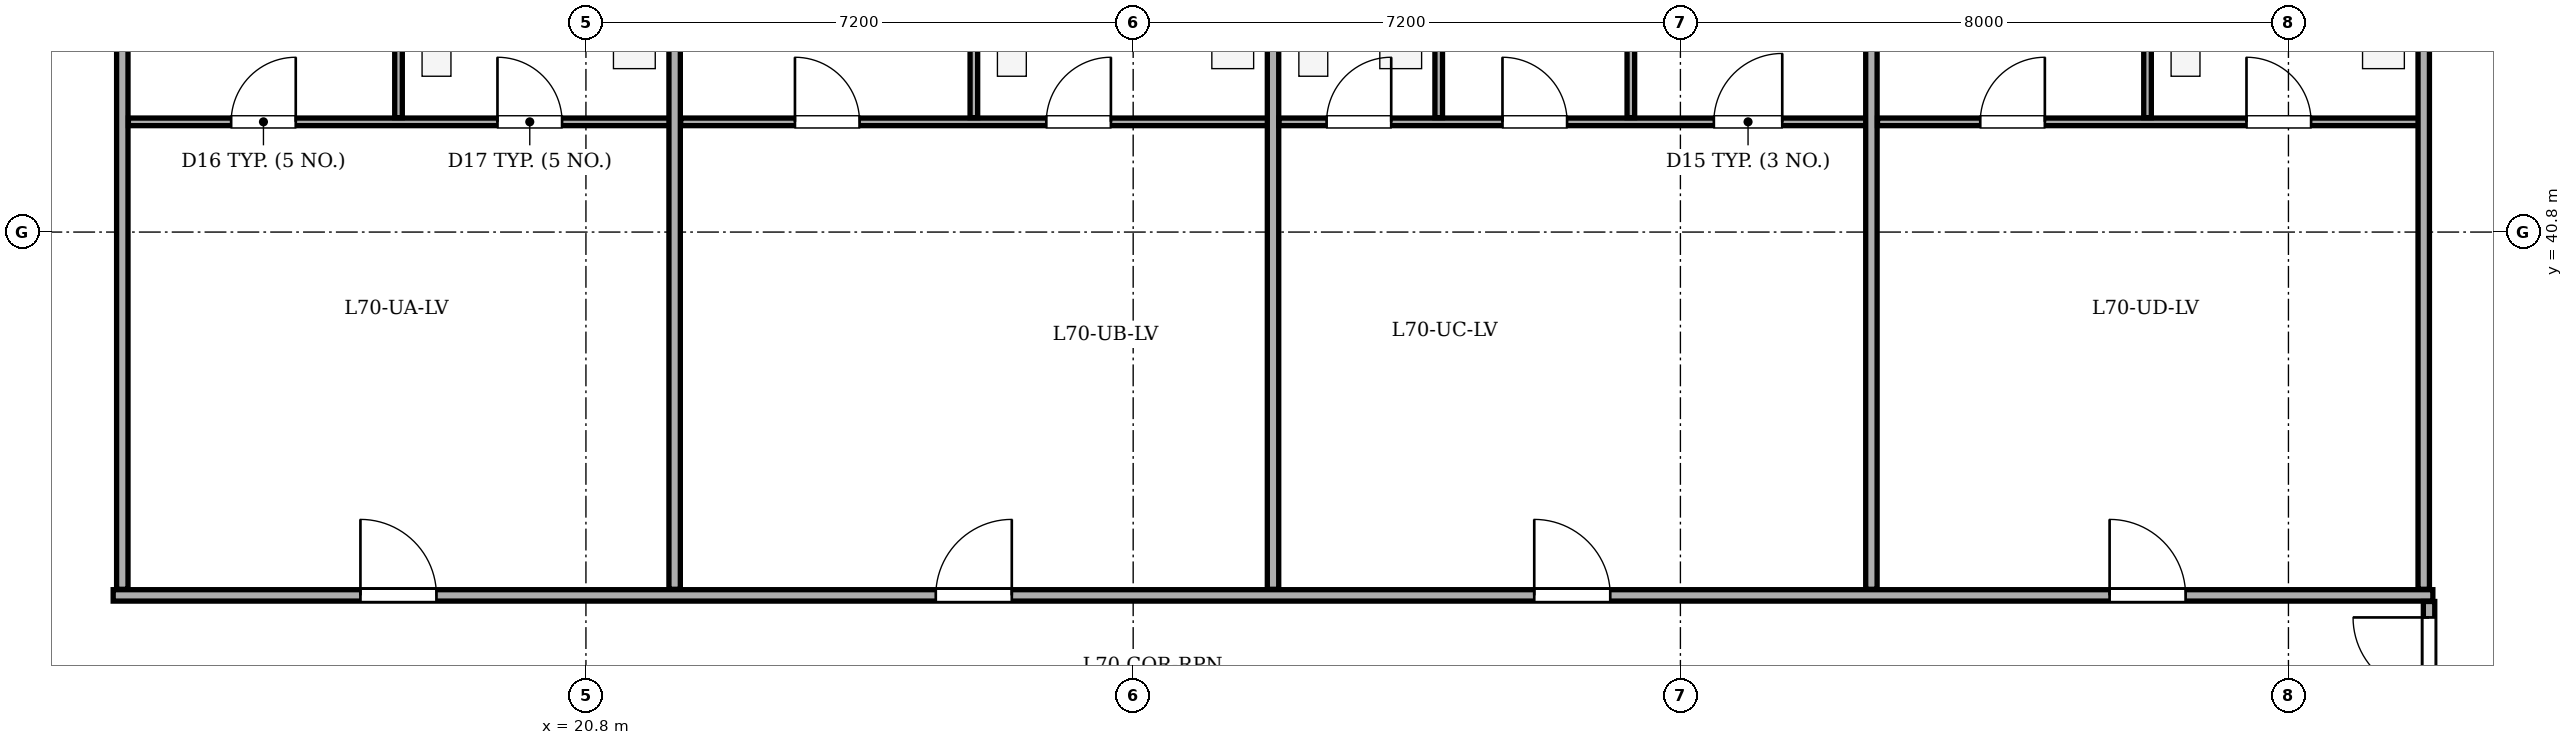
"""IFC4 building model, lengths in metres.
Left out: names, types, materials, properties, quantities, classifications, styles, units other than length and angle.
Written with IfcOpenShell. Run it as: python <this file> out.ifc"""

import sys

from ifc_helpers import new_model, si_unit, direction, frame, frame_2d, origin, place, context, subcontext, project, spatial, rectangle, extrude, element, fill, save


model = new_model("IFC4")
c1 = context("Model", 3, precision=1e-05, world=origin(), true_north=direction((0.0, 1.0)))
c2 = subcontext(c1, "Body", "Model", "MODEL_VIEW")
j1 = project(units=[si_unit("LENGTHUNIT", "METRE"), si_unit("PLANEANGLEUNIT", "RADIAN")], contexts=[c1])
p1 = place(None, origin())
s1 = spatial("IfcSite", under=j1, at=p1, CompositionType="ELEMENT")
p2 = place(p1, origin())
s2 = spatial("IfcBuilding", under=s1, at=p2, CompositionType="ELEMENT")
p3 = place(p2, frame((0.0, 0.0, 265.3)))
s3 = spatial("IfcBuildingStorey", under=s2, at=p3, CompositionType="ELEMENT", Elevation=265.3)
p4 = place(p3, frame((10.88, 41.1, 0.0), z_axis=(0.0, 0.0, 1.0), x_axis=(0.70712937715, 0.707084184501, 0.0)))
e1 = element("IfcWall", 1, at=p4, inside=s3, PredefinedType="STANDARD", context=c2, shape_type="SweptSolid", body=[
    extrude(rectangle(XDim=5.402, YDim=0.32, at=frame_2d((2.701, 0.0))), origin(), (0.0, 0.0, 1.0), 2.335),
])
p5 = place(p4, frame((2.001, 0.0, 0.75)))
e2 = element("IfcOpeningElement", 2, at=p5, cuts=e1, PredefinedType="OPENING", context=c2, shape_type="SweptSolid", body=[
    extrude(rectangle(XDim=1.4, YDim=1.465, at=frame_2d((0.7, 0.732))), frame((0.0, 0.17, 0.0), z_axis=(0.0, -1.0, 0.0), x_axis=(1.0, 0.0, 0.0)), (0.0, 0.0, 1.0), 0.34),
])
p6 = place(p3, frame((14.58, 36.02, 0.0), z_axis=(0.0, 0.0, 1.0), x_axis=(1.0, 0.0, 0.0)))
e3 = element("IfcWall", 3, at=p6, inside=s3, PredefinedType="PARTITIONING", context=c2, shape_type="SweptSolid", body=[
    extrude(rectangle(XDim=30.52, YDim=0.15, at=frame_2d((15.26, 0.0))), origin(), (0.0, 0.0, 1.0), 2.95),
])
p7 = place(p6, frame((3.253, 0.0, 0.0)))
e4 = element("IfcOpeningElement", 4, at=p7, cuts=e3, PredefinedType="OPENING", context=c2, shape_type="SweptSolid", body=[
    extrude(rectangle(XDim=1.0, YDim=2.1, at=frame_2d((0.5, 1.05))), frame((0.0, 0.085, 0.0), z_axis=(0.0, -1.0, 0.0), x_axis=(1.0, 0.0, 0.0)), (0.0, 0.0, 1.0), 0.17),
])
p8 = place(p6, frame((10.823, 0.0, 0.0)))
e5 = element("IfcOpeningElement", 5, at=p8, cuts=e3, PredefinedType="OPENING", context=c2, shape_type="SweptSolid", body=[
    extrude(rectangle(XDim=1.0, YDim=2.1, at=frame_2d((0.5, 1.05))), frame((0.0, 0.085, 0.0), z_axis=(0.0, -1.0, 0.0), x_axis=(1.0, 0.0, 0.0)), (0.0, 0.0, 1.0), 0.17),
])
p9 = place(p6, frame((18.697, 0.0, 0.0)))
e6 = element("IfcOpeningElement", 6, at=p9, cuts=e3, PredefinedType="OPENING", context=c2, shape_type="SweptSolid", body=[
    extrude(rectangle(XDim=1.0, YDim=2.1, at=frame_2d((0.5, 1.05))), frame((0.0, 0.085, 0.0), z_axis=(0.0, -1.0, 0.0), x_axis=(1.0, 0.0, 0.0)), (0.0, 0.0, 1.0), 0.17),
])
p10 = place(p6, frame((26.267, 0.0, 0.0)))
e7 = element("IfcOpeningElement", 7, at=p10, cuts=e3, PredefinedType="OPENING", context=c2, shape_type="SweptSolid", body=[
    extrude(rectangle(XDim=1.0, YDim=2.1, at=frame_2d((0.5, 1.05))), frame((0.0, 0.085, 0.0), z_axis=(0.0, -1.0, 0.0), x_axis=(1.0, 0.0, 0.0)), (0.0, 0.0, 1.0), 0.17),
])
p11 = place(p3, frame((14.7, 36.1, 0.0), z_axis=(0.0, 0.0, 1.0), x_axis=(0.0, 1.0, 0.0)))
e8 = element("IfcWall", 8, at=p11, inside=s3, PredefinedType="PARTITIONING", context=c2, shape_type="SweptSolid", body=[
    extrude(rectangle(XDim=8.655, YDim=0.15, at=frame_2d((4.327, 0.0))), origin(), (0.0, 0.0, 1.0), 2.95),
])
p12 = place(p3, frame((14.78, 42.25, 0.0), z_axis=(0.0, 0.0, 1.0), x_axis=(1.0, 0.0, 0.0)))
e9 = element("IfcWall", 9, at=p12, inside=s3, PredefinedType="PARTITIONING", context=c2, shape_type="SweptSolid", body=[
    extrude(rectangle(XDim=7.227, YDim=0.1, at=frame_2d((3.614, 0.0))), origin(), (0.0, 0.0, 1.0), 2.95),
])
p13 = place(p12, frame((1.352, 0.0, 0.0)))
e10 = element("IfcOpeningElement", 10, at=p13, cuts=e9, PredefinedType="OPENING", context=c2, shape_type="SweptSolid", body=[
    extrude(rectangle(XDim=0.85, YDim=2.05, at=frame_2d((0.425, 1.025))), frame((0.0, 0.06, 0.0), z_axis=(0.0, -1.0, 0.0), x_axis=(1.0, 0.0, 0.0)), (0.0, 0.0, 1.0), 0.12),
])
p14 = place(p12, frame((4.856, 0.0, 0.0)))
e11 = element("IfcOpeningElement", 11, at=p14, cuts=e9, PredefinedType="OPENING", context=c2, shape_type="SweptSolid", body=[
    extrude(rectangle(XDim=0.85, YDim=2.05, at=frame_2d((0.425, 1.025))), frame((0.0, 0.06, 0.0), z_axis=(0.0, -1.0, 0.0), x_axis=(1.0, 0.0, 0.0)), (0.0, 0.0, 1.0), 0.12),
])
p15 = place(p3, frame((18.334, 42.305, 0.0), z_axis=(0.0, 0.0, 1.0), x_axis=(0.0, 1.0, 0.0)))
e12 = element("IfcWall", 12, at=p15, inside=s3, PredefinedType="PARTITIONING", context=c2, shape_type="SweptSolid", body=[
    extrude(rectangle(XDim=2.45, YDim=0.1, at=frame_2d((1.225, 0.0))), origin(), (0.0, 0.0, 1.0), 2.95),
])
p16 = place(p3, frame((21.967, 36.1, 0.0), z_axis=(0.0, 0.0, 1.0), x_axis=(0.0, 1.0, 0.0)))
e13 = element("IfcWall", 13, at=p16, inside=s3, PredefinedType="PARTITIONING", context=c2, shape_type="SweptSolid", body=[
    extrude(rectangle(XDim=8.655, YDim=0.15, at=frame_2d((4.327, 0.0))), origin(), (0.0, 0.0, 1.0), 2.95),
])
p17 = place(p3, frame((22.047, 42.25, 0.0), z_axis=(0.0, 0.0, 1.0), x_axis=(1.0, 0.0, 0.0)))
e14 = element("IfcWall", 14, at=p17, inside=s3, PredefinedType="PARTITIONING", context=c2, shape_type="SweptSolid", body=[
    extrude(rectangle(XDim=7.833, YDim=0.1, at=frame_2d((3.917, 0.0))), origin(), (0.0, 0.0, 1.0), 2.95),
])
p18 = place(p17, frame((1.503, 0.0, 0.0)))
e15 = element("IfcOpeningElement", 15, at=p18, cuts=e14, PredefinedType="OPENING", context=c2, shape_type="SweptSolid", body=[
    extrude(rectangle(XDim=0.85, YDim=2.05, at=frame_2d((0.425, 1.025))), frame((0.0, 0.06, 0.0), z_axis=(0.0, -1.0, 0.0), x_axis=(1.0, 0.0, 0.0)), (0.0, 0.0, 1.0), 0.12),
])
p19 = place(p17, frame((4.81, 0.0, 0.0)))
e16 = element("IfcOpeningElement", 16, at=p19, cuts=e14, PredefinedType="OPENING", context=c2, shape_type="SweptSolid", body=[
    extrude(rectangle(XDim=0.85, YDim=2.05, at=frame_2d((0.425, 1.025))), frame((0.0, 0.06, 0.0), z_axis=(0.0, -1.0, 0.0), x_axis=(1.0, 0.0, 0.0)), (0.0, 0.0, 1.0), 0.12),
])
p20 = place(p3, frame((25.904, 42.305, 0.0), z_axis=(0.0, 0.0, 1.0), x_axis=(0.0, 1.0, 0.0)))
e17 = element("IfcWall", 17, at=p20, inside=s3, PredefinedType="PARTITIONING", context=c2, shape_type="SweptSolid", body=[
    extrude(rectangle(XDim=2.45, YDim=0.1, at=frame_2d((1.225, 0.0))), origin(), (0.0, 0.0, 1.0), 2.95),
])
p21 = place(p3, frame((29.84, 36.1, 0.0), z_axis=(0.0, 0.0, 1.0), x_axis=(0.0, 1.0, 0.0)))
e18 = element("IfcWall", 18, at=p21, inside=s3, PredefinedType="PARTITIONING", context=c2, shape_type="SweptSolid", body=[
    extrude(rectangle(XDim=8.655, YDim=0.15, at=frame_2d((4.327, 0.0))), origin(), (0.0, 0.0, 1.0), 2.385),
])
p22 = place(p3, frame((29.92, 42.25, 0.0), z_axis=(0.0, 0.0, 1.0), x_axis=(1.0, 0.0, 0.0)))
e19 = element("IfcWall", 19, at=p22, inside=s3, PredefinedType="PARTITIONING", context=c2, shape_type="SweptSolid", body=[
    extrude(rectangle(XDim=7.833, YDim=0.1, at=frame_2d((3.917, 0.0))), origin(), (0.0, 0.0, 1.0), 2.95),
])
p23 = place(p22, frame((0.625, 0.0, 0.0)))
e20 = element("IfcOpeningElement", 20, at=p23, cuts=e19, PredefinedType="OPENING", context=c2, shape_type="SweptSolid", body=[
    extrude(rectangle(XDim=0.85, YDim=2.05, at=frame_2d((0.425, 1.025))), frame((0.0, 0.06, 0.0), z_axis=(0.0, -1.0, 0.0), x_axis=(1.0, 0.0, 0.0)), (0.0, 0.0, 1.0), 0.12),
])
p24 = place(p22, frame((2.939, 0.0, 0.0)))
e21 = element("IfcOpeningElement", 21, at=p24, cuts=e19, PredefinedType="OPENING", context=c2, shape_type="SweptSolid", body=[
    extrude(rectangle(XDim=0.85, YDim=2.05, at=frame_2d((0.425, 1.025))), frame((0.0, 0.06, 0.0), z_axis=(0.0, -1.0, 0.0), x_axis=(1.0, 0.0, 0.0)), (0.0, 0.0, 1.0), 0.12),
])
p25 = place(p22, frame((5.72, 0.0, 0.0)))
e22 = element("IfcOpeningElement", 22, at=p25, cuts=e19, PredefinedType="OPENING", context=c2, shape_type="SweptSolid", body=[
    extrude(rectangle(XDim=0.9, YDim=2.05, at=frame_2d((0.45, 1.025))), frame((0.0, 0.06, 0.0), z_axis=(0.0, -1.0, 0.0), x_axis=(1.0, 0.0, 0.0)), (0.0, 0.0, 1.0), 0.12),
])
for number, where, z_axis, x_axis in (
    (23, (32.02, 42.305, 0.0), (0.0, 0.0, 1.0), (0.0, 1.0, 0.0)),
    (24, (34.548, 42.305, 0.0), (0.0, 0.0, 1.0), (0.0, 1.0, 0.0)),
):
    element("IfcWall", number, at=place(p3, frame(where, z_axis=z_axis, x_axis=x_axis)), inside=s3, PredefinedType="PARTITIONING", context=c2, shape_type="SweptSolid", body=[
        extrude(rectangle(XDim=2.45, YDim=0.1, at=frame_2d((1.225, 0.0))), origin(), (0.0, 0.0, 1.0), 2.95),
    ])
p26 = place(p3, frame((37.713, 36.1, 0.0), z_axis=(0.0, 0.0, 1.0), x_axis=(0.0, 1.0, 0.0)))
e25 = element("IfcWall", 25, at=p26, inside=s3, PredefinedType="PARTITIONING", context=c2, shape_type="SweptSolid", body=[
    extrude(rectangle(XDim=8.655, YDim=0.15, at=frame_2d((4.327, 0.0))), origin(), (0.0, 0.0, 1.0), 2.95),
])
p27 = place(p3, frame((37.793, 42.25, 0.0), z_axis=(0.0, 0.0, 1.0), x_axis=(1.0, 0.0, 0.0)))
e26 = element("IfcWall", 26, at=p27, inside=s3, PredefinedType="PARTITIONING", context=c2, shape_type="SweptSolid", body=[
    extrude(rectangle(XDim=7.227, YDim=0.1, at=frame_2d((3.614, 0.0))), origin(), (0.0, 0.0, 1.0), 2.95),
])
p28 = place(p27, frame((1.352, 0.0, 0.0)))
e27 = element("IfcOpeningElement", 27, at=p28, cuts=e26, PredefinedType="OPENING", context=c2, shape_type="SweptSolid", body=[
    extrude(rectangle(XDim=0.85, YDim=2.05, at=frame_2d((0.425, 1.025))), frame((0.0, 0.06, 0.0), z_axis=(0.0, -1.0, 0.0), x_axis=(1.0, 0.0, 0.0)), (0.0, 0.0, 1.0), 0.12),
])
p29 = place(p27, frame((4.855, 0.0, 0.0)))
e28 = element("IfcOpeningElement", 28, at=p29, cuts=e26, PredefinedType="OPENING", context=c2, shape_type="SweptSolid", body=[
    extrude(rectangle(XDim=0.85, YDim=2.05, at=frame_2d((0.425, 1.025))), frame((0.0, 0.06, 0.0), z_axis=(0.0, -1.0, 0.0), x_axis=(1.0, 0.0, 0.0)), (0.0, 0.0, 1.0), 0.12),
])
p30 = place(p3, frame((41.346, 42.305, 0.0), z_axis=(0.0, 0.0, 1.0), x_axis=(0.0, 1.0, 0.0)))
e29 = element("IfcWall", 29, at=p30, inside=s3, PredefinedType="PARTITIONING", context=c2, shape_type="SweptSolid", body=[
    extrude(rectangle(XDim=2.45, YDim=0.1, at=frame_2d((1.225, 0.0))), origin(), (0.0, 0.0, 1.0), 2.95),
])
p31 = place(p3, frame((44.98, 36.1, 0.0), z_axis=(0.0, 0.0, 1.0), x_axis=(0.0, 1.0, 0.0)))
e30 = element("IfcWall", 30, at=p31, inside=s3, PredefinedType="PARTITIONING", context=c2, shape_type="SweptSolid", body=[
    extrude(rectangle(XDim=8.655, YDim=0.15, at=frame_2d((4.327, 0.0))), origin(), (0.0, 0.0, 1.0), 2.95),
])
p32 = place(p3, frame((45.05, 34.15, 0.0), z_axis=(0.0, 0.0, 1.0), x_axis=(0.0, 1.0, 0.0)))
e31 = element("IfcWall", 31, at=p32, inside=s3, PredefinedType="PARTITIONING", context=c2, shape_type="SweptSolid", body=[
    extrude(rectangle(XDim=1.79, YDim=0.15, at=frame_2d((0.895, 0.0))), origin(), (0.0, 0.0, 1.0), 2.135),
])
p33 = place(p32, frame((0.58, 0.0, 0.0)))
e32 = element("IfcOpeningElement", 32, at=p33, cuts=e31, PredefinedType="OPENING", context=c2, shape_type="SweptSolid", body=[
    extrude(rectangle(XDim=1.0, YDim=2.1, at=frame_2d((0.5, 1.05))), frame((0.0, 0.085, 0.0), z_axis=(0.0, -1.0, 0.0), x_axis=(1.0, 0.0, 0.0)), (0.0, 0.0, 1.0), 0.17),
])
p34 = place(p7, origin())
e33 = element("IfcDoor", 33, at=p34, inside=s3, OperationType="SINGLE_SWING_LEFT", PredefinedType="DOOR", context=c2, shape_type="SweptSolid", body=[
    extrude(rectangle(XDim=1.0, YDim=2.1, at=frame_2d((0.5, 1.05))), frame((0.0, 0.025, 0.0), z_axis=(0.0, -1.0, 0.0), x_axis=(1.0, 0.0, 0.0)), (0.0, 0.0, 1.0), 0.05),
])
fill(e4, e33)
p35 = place(p8, origin())
e34 = element("IfcDoor", 34, at=p35, inside=s3, OperationType="SINGLE_SWING_RIGHT", PredefinedType="DOOR", context=c2, shape_type="SweptSolid", body=[
    extrude(rectangle(XDim=1.0, YDim=2.1, at=frame_2d((0.5, 1.05))), frame((0.0, 0.025, 0.0), z_axis=(0.0, -1.0, 0.0), x_axis=(1.0, 0.0, 0.0)), (0.0, 0.0, 1.0), 0.05),
])
fill(e5, e34)
p36 = place(p9, origin())
e35 = element("IfcDoor", 35, at=p36, inside=s3, OperationType="SINGLE_SWING_LEFT", PredefinedType="DOOR", context=c2, shape_type="SweptSolid", body=[
    extrude(rectangle(XDim=1.0, YDim=2.1, at=frame_2d((0.5, 1.05))), frame((0.0, 0.025, 0.0), z_axis=(0.0, -1.0, 0.0), x_axis=(1.0, 0.0, 0.0)), (0.0, 0.0, 1.0), 0.05),
])
fill(e6, e35)
p37 = place(p10, origin())
e36 = element("IfcDoor", 36, at=p37, inside=s3, OperationType="SINGLE_SWING_LEFT", PredefinedType="DOOR", context=c2, shape_type="SweptSolid", body=[
    extrude(rectangle(XDim=1.0, YDim=2.1, at=frame_2d((0.5, 1.05))), frame((0.0, 0.025, 0.0), z_axis=(0.0, -1.0, 0.0), x_axis=(1.0, 0.0, 0.0)), (0.0, 0.0, 1.0), 0.05),
])
fill(e7, e36)
p38 = place(p13, origin())
e37 = element("IfcDoor", 37, at=p38, inside=s3, OperationType="SINGLE_SWING_RIGHT", PredefinedType="DOOR", context=c2, shape_type="SweptSolid", body=[
    extrude(rectangle(XDim=0.85, YDim=2.05, at=frame_2d((0.425, 1.025))), frame((0.0, 0.025, 0.0), z_axis=(0.0, -1.0, 0.0), x_axis=(1.0, 0.0, 0.0)), (0.0, 0.0, 1.0), 0.05),
])
fill(e10, e37)
p39 = place(p14, origin())
e38 = element("IfcDoor", 38, at=p39, inside=s3, OperationType="SINGLE_SWING_LEFT", PredefinedType="DOOR", context=c2, shape_type="SweptSolid", body=[
    extrude(rectangle(XDim=0.85, YDim=2.05, at=frame_2d((0.425, 1.025))), frame((0.0, 0.025, 0.0), z_axis=(0.0, -1.0, 0.0), x_axis=(1.0, 0.0, 0.0)), (0.0, 0.0, 1.0), 0.05),
])
fill(e11, e38)
p40 = place(p18, origin())
e39 = element("IfcDoor", 39, at=p40, inside=s3, OperationType="SINGLE_SWING_LEFT", PredefinedType="DOOR", context=c2, shape_type="SweptSolid", body=[
    extrude(rectangle(XDim=0.85, YDim=2.05, at=frame_2d((0.425, 1.025))), frame((0.0, 0.025, 0.0), z_axis=(0.0, -1.0, 0.0), x_axis=(1.0, 0.0, 0.0)), (0.0, 0.0, 1.0), 0.05),
])
fill(e15, e39)
p41 = place(p19, origin())
e40 = element("IfcDoor", 40, at=p41, inside=s3, OperationType="SINGLE_SWING_RIGHT", PredefinedType="DOOR", context=c2, shape_type="SweptSolid", body=[
    extrude(rectangle(XDim=0.85, YDim=2.05, at=frame_2d((0.425, 1.025))), frame((0.0, 0.025, 0.0), z_axis=(0.0, -1.0, 0.0), x_axis=(1.0, 0.0, 0.0)), (0.0, 0.0, 1.0), 0.05),
])
fill(e16, e40)
p42 = place(p23, origin())
e41 = element("IfcDoor", 41, at=p42, inside=s3, OperationType="SINGLE_SWING_RIGHT", PredefinedType="DOOR", context=c2, shape_type="SweptSolid", body=[
    extrude(rectangle(XDim=0.85, YDim=2.05, at=frame_2d((0.425, 1.025))), frame((0.0, 0.025, 0.0), z_axis=(0.0, -1.0, 0.0), x_axis=(1.0, 0.0, 0.0)), (0.0, 0.0, 1.0), 0.05),
])
fill(e20, e41)
p43 = place(p24, origin())
e42 = element("IfcDoor", 42, at=p43, inside=s3, OperationType="SINGLE_SWING_LEFT", PredefinedType="DOOR", context=c2, shape_type="SweptSolid", body=[
    extrude(rectangle(XDim=0.85, YDim=2.05, at=frame_2d((0.425, 1.025))), frame((0.0, 0.025, 0.0), z_axis=(0.0, -1.0, 0.0), x_axis=(1.0, 0.0, 0.0)), (0.0, 0.0, 1.0), 0.05),
])
fill(e21, e42)
p44 = place(p25, origin())
e43 = element("IfcDoor", 43, at=p44, inside=s3, OperationType="SINGLE_SWING_RIGHT", PredefinedType="DOOR", context=c2, shape_type="SweptSolid", body=[
    extrude(rectangle(XDim=0.9, YDim=2.05, at=frame_2d((0.45, 1.025))), frame((0.0, 0.025, 0.0), z_axis=(0.0, -1.0, 0.0), x_axis=(1.0, 0.0, 0.0)), (0.0, 0.0, 1.0), 0.05),
])
fill(e22, e43)
p45 = place(p28, origin())
e44 = element("IfcDoor", 44, at=p45, inside=s3, OperationType="SINGLE_SWING_RIGHT", PredefinedType="DOOR", context=c2, shape_type="SweptSolid", body=[
    extrude(rectangle(XDim=0.85, YDim=2.05, at=frame_2d((0.425, 1.025))), frame((0.0, 0.025, 0.0), z_axis=(0.0, -1.0, 0.0), x_axis=(1.0, 0.0, 0.0)), (0.0, 0.0, 1.0), 0.05),
])
fill(e27, e44)
p46 = place(p29, origin())
e45 = element("IfcDoor", 45, at=p46, inside=s3, OperationType="SINGLE_SWING_LEFT", PredefinedType="DOOR", context=c2, shape_type="SweptSolid", body=[
    extrude(rectangle(XDim=0.85, YDim=2.05, at=frame_2d((0.425, 1.025))), frame((0.0, 0.025, 0.0), z_axis=(0.0, -1.0, 0.0), x_axis=(1.0, 0.0, 0.0)), (0.0, 0.0, 1.0), 0.05),
])
fill(e28, e45)
p47 = place(p33, origin())
e46 = element("IfcDoor", 46, at=p47, inside=s3, OperationType="SINGLE_SWING_RIGHT", PredefinedType="DOOR", context=c2, shape_type="SweptSolid", body=[
    extrude(rectangle(XDim=1.0, YDim=2.1, at=frame_2d((0.5, 1.05))), frame((0.0, 0.025, 0.0), z_axis=(0.0, -1.0, 0.0), x_axis=(1.0, 0.0, 0.0)), (0.0, 0.0, 1.0), 0.05),
])
fill(e32, e46)
save(model, sys.argv[1])
